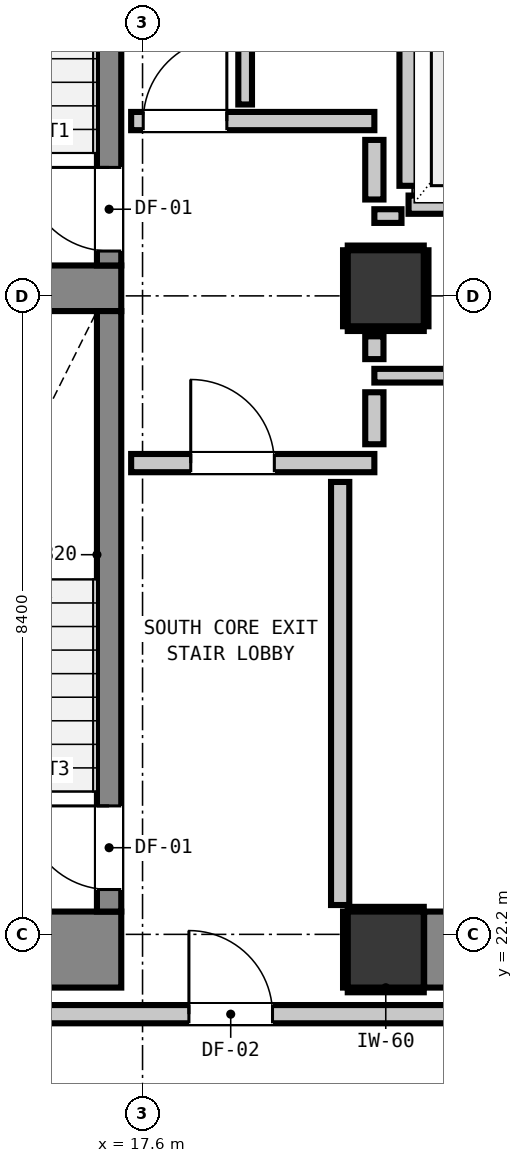
"""IFC4 building model, lengths in metres.
Left out: names, types, materials, properties, quantities, classifications, styles, units other than length and angle.
Written with IfcOpenShell. Run it as: python <this file> out.ifc"""

import sys

from ifc_helpers import new_model, si_unit, direction, frame, frame_2d, origin, origin_2d, place, context, subcontext, project, spatial, rectangle, extrude, element, fill, save


model = new_model("IFC4")
c1 = context("Model", 3, precision=1e-05, world=origin(), true_north=direction((0.0, 1.0)))
c2 = subcontext(c1, "Body", "Model", "MODEL_VIEW")
j1 = project(units=[si_unit("LENGTHUNIT", "METRE"), si_unit("PLANEANGLEUNIT", "RADIAN")], contexts=[c1])
p1 = place(None, origin())
s1 = spatial("IfcSite", under=j1, at=p1, CompositionType="ELEMENT")
p2 = place(p1, origin())
s2 = spatial("IfcBuilding", under=s1, at=p2, CompositionType="ELEMENT")
p3 = place(p2, frame((0.0, 0.0, 112.72)))
s3 = spatial("IfcBuildingStorey", under=s2, at=p3, CompositionType="ELEMENT", Elevation=112.72)
p4 = place(p3, frame((20.8, 22.0, 0.0), z_axis=(0.0, 0.0, 1.0), x_axis=(1.0, 0.0, 0.0)))
e1 = element("IfcColumn", 1, at=p4, inside=s3, PredefinedType="COLUMN", context=c2, shape_type="SweptSolid", body=[
    extrude(rectangle(XDim=1.0, YDim=1.0, at=origin_2d()), origin(), (0.0, 0.0, 1.0), 3.32),
])
p5 = place(p3, frame((13.24, 22.0, 0.0), z_axis=(0.0, 0.0, 1.0), x_axis=(1.0, 0.0, 0.0)))
e2 = element("IfcWall", 2, at=p5, inside=s3, PredefinedType="SHEAR", context=c2, shape_type="SweptSolid", body=[
    extrude(rectangle(XDim=4.08, YDim=1.0, at=frame_2d((2.04, 0.0))), origin(), (0.0, 0.0, 1.0), 3.32),
])
p6 = place(p3, frame((13.905, 30.7, 0.0), z_axis=(0.0, 0.0, 1.0), x_axis=(1.0, 0.0, 0.0)))
e3 = element("IfcWall", 3, at=p6, inside=s3, PredefinedType="SHEAR", context=c2, shape_type="SweptSolid", body=[
    extrude(rectangle(XDim=3.415, YDim=0.6, at=frame_2d((1.708, 0.0))), origin(), (0.0, 0.0, 1.0), 3.32),
])
p7 = place(p3, frame((21.305, 22.0, 0.0), z_axis=(0.0, 0.0, 1.0), x_axis=(1.0, 0.0, 0.0)))
e4 = element("IfcWall", 4, at=p7, inside=s3, PredefinedType="SHEAR", context=c2, shape_type="SweptSolid", body=[
    extrude(rectangle(XDim=7.39, YDim=1.0, at=frame_2d((3.695, 0.0))), origin(), (0.0, 0.0, 1.0), 3.32),
])
p8 = place(p3, frame((17.16, 31.0, 0.0), z_axis=(0.0, 0.0, 1.0), x_axis=(0.0, 1.0, 0.0)))
e5 = element("IfcWall", 5, at=p8, inside=s3, PredefinedType="SHEAR", context=c2, shape_type="SweptSolid", body=[
    extrude(rectangle(XDim=7.8, YDim=0.32, at=frame_2d((3.9, 0.0))), origin(), (0.0, 0.0, 1.0), 3.32),
])
p9 = place(p8, frame((0.19, 0.0, 0.0)))
e6 = element("IfcOpeningElement", 6, at=p9, cuts=e5, PredefinedType="OPENING", context=c2, shape_type="SweptSolid", body=[
    extrude(rectangle(XDim=1.1, YDim=2.15, at=frame_2d((0.55, 1.075))), frame((0.0, 0.17, 0.0), z_axis=(0.0, -1.0, 0.0), x_axis=(1.0, 0.0, 0.0)), (0.0, 0.0, 1.0), 0.34),
])
p10 = place(p3, frame((17.16, 22.5, 0.0), z_axis=(0.0, 0.0, 1.0), x_axis=(0.0, 1.0, 0.0)))
e7 = element("IfcWall", 7, at=p10, inside=s3, PredefinedType="SHEAR", context=c2, shape_type="SweptSolid", body=[
    extrude(rectangle(XDim=7.9, YDim=0.32, at=frame_2d((3.95, 0.0))), origin(), (0.0, 0.0, 1.0), 3.32),
])
p11 = place(p10, frame((0.29, 0.0, 0.0)))
e8 = element("IfcOpeningElement", 8, at=p11, cuts=e7, PredefinedType="OPENING", context=c2, shape_type="SweptSolid", body=[
    extrude(rectangle(XDim=1.1, YDim=2.15, at=frame_2d((0.55, 1.075))), frame((0.0, 0.17, 0.0), z_axis=(0.0, -1.0, 0.0), x_axis=(1.0, 0.0, 0.0)), (0.0, 0.0, 1.0), 0.34),
])
p12 = place(p3, frame((20.8, 30.7, 0.0), z_axis=(0.0, 0.0, 1.0), x_axis=(1.0, 0.0, 0.0)))
e9 = element("IfcColumn", 9, at=p12, inside=s3, PredefinedType="COLUMN", context=c2, shape_type="SweptSolid", body=[
    extrude(rectangle(XDim=1.0, YDim=1.0, at=origin_2d()), origin(), (0.0, 0.0, 1.0), 3.32),
])
p13 = place(p3, frame((21.1, 31.8, 0.0), z_axis=(0.0, 0.0, 1.0), x_axis=(1.0, 0.0, 0.0)))
e10 = element("IfcWall", 10, at=p13, inside=s3, PredefinedType="PARTITIONING", context=c2, shape_type="SweptSolid", body=[
    extrude(rectangle(XDim=2.2, YDim=0.24, at=frame_2d((1.1, 0.0))), origin(), (0.0, 0.0, 1.0), 3.08),
])
p14 = place(p3, frame((21.1, 32.048, 0.0), z_axis=(0.0, 0.0, 1.0), x_axis=(0.0, 1.0, 0.0)))
e11 = element("IfcWall", 11, at=p14, inside=s3, PredefinedType="PARTITIONING", context=c2, shape_type="SweptSolid", body=[
    extrude(rectangle(XDim=2.104, YDim=0.24, at=frame_2d((1.052, 0.0))), origin(), (0.0, 0.0, 1.0), 2.315),
])
p15 = place(p3, frame((3.207, 21.15, 0.0), z_axis=(0.0, 0.0, 1.0), x_axis=(1.0, 0.0, 0.0)))
e12 = element("IfcWall", 12, at=p15, inside=s3, PredefinedType="PARTITIONING", context=c2, shape_type="SweptSolid", body=[
    extrude(rectangle(XDim=39.386, YDim=0.24, at=frame_2d((19.693, 0.0))), origin(), (0.0, 0.0, 1.0), 3.08),
])
p16 = place(p15, frame((15.003, 0.0, 0.0)))
e13 = element("IfcOpeningElement", 13, at=p16, cuts=e12, PredefinedType="OPENING", context=c2, shape_type="SweptSolid", body=[
    extrude(rectangle(XDim=1.1, YDim=2.15, at=frame_2d((0.55, 1.075))), frame((0.0, 0.13, 0.0), z_axis=(0.0, -1.0, 0.0), x_axis=(1.0, 0.0, 0.0)), (0.0, 0.0, 1.0), 0.26),
])
p17 = place(p15, frame((7.243, 0.0, 0.0)))
e14 = element("IfcOpeningElement", 14, at=p17, cuts=e12, PredefinedType="OPENING", context=c2, shape_type="SweptSolid", body=[
    extrude(rectangle(XDim=1.4, YDim=2.15, at=frame_2d((0.7, 1.075))), frame((0.0, 0.13, 0.0), z_axis=(0.0, -1.0, 0.0), x_axis=(1.0, 0.0, 0.0)), (0.0, 0.0, 1.0), 0.26),
])
p18 = place(p15, frame((34.843, 0.0, 0.0)))
e15 = element("IfcOpeningElement", 15, at=p18, cuts=e12, PredefinedType="OPENING", context=c2, shape_type="SweptSolid", body=[
    extrude(rectangle(XDim=1.4, YDim=2.15, at=frame_2d((0.7, 1.075))), frame((0.0, 0.13, 0.0), z_axis=(0.0, -1.0, 0.0), x_axis=(1.0, 0.0, 0.0)), (0.0, 0.0, 1.0), 0.26),
])
p19 = place(p3, frame((17.45, 28.4, 0.0), z_axis=(0.0, 0.0, 1.0), x_axis=(1.0, 0.0, 0.0)))
e16 = element("IfcWall", 16, at=p19, inside=s3, PredefinedType="PARTITIONING", context=c2, shape_type="SweptSolid", body=[
    extrude(rectangle(XDim=3.2, YDim=0.24, at=frame_2d((1.6, 0.0))), origin(), (0.0, 0.0, 1.0), 3.08),
])
p20 = place(p19, frame((0.784, 0.0, 0.0)))
e17 = element("IfcOpeningElement", 17, at=p20, cuts=e16, PredefinedType="OPENING", context=c2, shape_type="SweptSolid", body=[
    extrude(rectangle(XDim=1.1, YDim=2.15, at=frame_2d((0.55, 1.075))), frame((0.0, 0.13, 0.0), z_axis=(0.0, -1.0, 0.0), x_axis=(1.0, 0.0, 0.0)), (0.0, 0.0, 1.0), 0.26),
])
p21 = place(p3, frame((17.45, 32.9, 0.0), z_axis=(0.0, 0.0, 1.0), x_axis=(1.0, 0.0, 0.0)))
e18 = element("IfcWall", 18, at=p21, inside=s3, PredefinedType="PARTITIONING", context=c2, shape_type="SweptSolid", body=[
    extrude(rectangle(XDim=3.2, YDim=0.24, at=frame_2d((1.6, 0.0))), origin(), (0.0, 0.0, 1.0), 3.08),
])
p22 = place(p21, frame((0.159, 0.0, 0.0)))
e19 = element("IfcOpeningElement", 19, at=p22, cuts=e18, PredefinedType="OPENING", context=c2, shape_type="SweptSolid", body=[
    extrude(rectangle(XDim=1.1, YDim=2.15, at=frame_2d((0.55, 1.075))), frame((0.0, 0.13, 0.0), z_axis=(0.0, -1.0, 0.0), x_axis=(1.0, 0.0, 0.0)), (0.0, 0.0, 1.0), 0.26),
])
p23 = place(p3, frame((20.65, 29.55, 0.0), z_axis=(0.0, 0.0, 1.0), x_axis=(1.0, 0.0, 0.0)))
e20 = element("IfcWall", 20, at=p23, inside=s3, PredefinedType="PARTITIONING", context=c2, shape_type="SweptSolid", body=[
    extrude(rectangle(XDim=9.325, YDim=0.18, at=frame_2d((4.663, 0.0))), origin(), (0.0, 0.0, 1.0), 3.08),
])
p24 = place(p3, frame((20.65, 31.65, 0.0), z_axis=(0.0, 0.0, 1.0), x_axis=(1.0, 0.0, 0.0)))
e21 = element("IfcWall", 21, at=p24, inside=s3, PredefinedType="PARTITIONING", context=c2, shape_type="SweptSolid", body=[
    extrude(rectangle(XDim=0.357, YDim=0.18, at=frame_2d((0.179, 0.0))), origin(), (0.0, 0.0, 1.0), 3.08),
])
p25 = place(p3, frame((20.2, 22.586, 0.0), z_axis=(0.0, 0.0, 1.0), x_axis=(0.0, 1.0, 0.0)))
e22 = element("IfcWall", 22, at=p25, inside=s3, PredefinedType="PARTITIONING", context=c2, shape_type="SweptSolid", body=[
    extrude(rectangle(XDim=5.566, YDim=0.24, at=frame_2d((2.783, 0.0))), origin(), (0.0, 0.0, 1.0), 3.08),
])
p26 = place(p3, frame((20.65, 28.648, 0.0), z_axis=(0.0, 0.0, 1.0), x_axis=(0.0, 1.0, 0.0)))
e23 = element("IfcWall", 23, at=p26, inside=s3, PredefinedType="PARTITIONING", context=c2, shape_type="SweptSolid", body=[
    extrude(rectangle(XDim=0.684, YDim=0.24, at=frame_2d((0.342, 0.0))), origin(), (0.0, 0.0, 1.0), 2.315),
])
p27 = place(p3, frame((20.65, 29.768, 0.0), z_axis=(0.0, 0.0, 1.0), x_axis=(0.0, 1.0, 0.0)))
e24 = element("IfcWall", 24, at=p27, inside=s3, PredefinedType="PARTITIONING", context=c2, shape_type="SweptSolid", body=[
    extrude(rectangle(XDim=0.3, YDim=0.24, at=frame_2d((0.15, 0.0))), origin(), (0.0, 0.0, 1.0), 2.315),
])
p28 = place(p3, frame((20.65, 31.868, 0.0), z_axis=(0.0, 0.0, 1.0), x_axis=(0.0, 1.0, 0.0)))
e25 = element("IfcWall", 25, at=p28, inside=s3, PredefinedType="PARTITIONING", context=c2, shape_type="SweptSolid", body=[
    extrude(rectangle(XDim=0.784, YDim=0.24, at=frame_2d((0.392, 0.0))), origin(), (0.0, 0.0, 1.0), 2.315),
])
p29 = place(p3, frame((18.95, 33.118, 0.0), z_axis=(0.0, 0.0, 1.0), x_axis=(0.0, 1.0, 0.0)))
e26 = element("IfcWall", 26, at=p29, inside=s3, PredefinedType="PARTITIONING", context=c2, shape_type="SweptSolid", body=[
    extrude(rectangle(XDim=2.374, YDim=0.18, at=frame_2d((1.187, 0.0))), origin(), (0.0, 0.0, 1.0), 3.08),
])
for number, where, z_axis, x_axis in (
    (27, (20.3, 21.468, 0.0), (0.0, 0.0, 1.0), (1.0, 0.0, 0.0)),
    (28, (20.3, 22.532, 0.0), (0.0, 0.0, 1.0), (1.0, 0.0, 0.0)),
    (29, (20.268, 21.5, 0.0), (0.0, 0.0, 1.0), (0.0, 1.0, 0.0)),
    (30, (20.3, 30.168, 0.0), (0.0, 0.0, 1.0), (1.0, 0.0, 0.0)),
    (31, (20.3, 31.232, 0.0), (0.0, 0.0, 1.0), (1.0, 0.0, 0.0)),
    (32, (20.268, 30.2, 0.0), (0.0, 0.0, 1.0), (0.0, 1.0, 0.0)),
    (33, (21.332, 30.2, 0.0), (0.0, 0.0, 1.0), (0.0, 1.0, 0.0)),
):
    element("IfcWall", number, at=place(p3, frame(where, z_axis=z_axis, x_axis=x_axis)), inside=s3, PredefinedType="PARTITIONING", context=c2, shape_type="SweptSolid", body=[
        extrude(rectangle(XDim=1.0, YDim=0.06, at=frame_2d((0.5, 0.0))), origin(), (0.0, 0.0, 1.0), 1.45),
    ])
p30 = place(p9, origin())
e34 = element("IfcDoor", 34, at=p30, inside=s3, OperationType="SINGLE_SWING_RIGHT", PredefinedType="DOOR", context=c2, shape_type="SweptSolid", body=[
    extrude(rectangle(XDim=1.1, YDim=2.15, at=frame_2d((0.55, 1.075))), frame((0.0, 0.025, 0.0), z_axis=(0.0, -1.0, 0.0), x_axis=(1.0, 0.0, 0.0)), (0.0, 0.0, 1.0), 0.05),
])
fill(e6, e34)
p31 = place(p11, origin())
e35 = element("IfcDoor", 35, at=p31, inside=s3, OperationType="SINGLE_SWING_RIGHT", PredefinedType="DOOR", context=c2, shape_type="SweptSolid", body=[
    extrude(rectangle(XDim=1.1, YDim=2.15, at=frame_2d((0.55, 1.075))), frame((0.0, 0.025, 0.0), z_axis=(0.0, -1.0, 0.0), x_axis=(1.0, 0.0, 0.0)), (0.0, 0.0, 1.0), 0.05),
])
fill(e8, e35)
p32 = place(p20, origin())
e36 = element("IfcDoor", 36, at=p32, inside=s3, OperationType="SINGLE_SWING_LEFT", PredefinedType="DOOR", context=c2, shape_type="SweptSolid", body=[
    extrude(rectangle(XDim=1.1, YDim=2.15, at=frame_2d((0.55, 1.075))), frame((0.0, 0.025, 0.0), z_axis=(0.0, -1.0, 0.0), x_axis=(1.0, 0.0, 0.0)), (0.0, 0.0, 1.0), 0.05),
])
fill(e17, e36)
p33 = place(p22, origin())
e37 = element("IfcDoor", 37, at=p33, inside=s3, OperationType="SINGLE_SWING_RIGHT", PredefinedType="DOOR", context=c2, shape_type="SweptSolid", body=[
    extrude(rectangle(XDim=1.1, YDim=2.15, at=frame_2d((0.55, 1.075))), frame((0.0, 0.025, 0.0), z_axis=(0.0, -1.0, 0.0), x_axis=(1.0, 0.0, 0.0)), (0.0, 0.0, 1.0), 0.05),
])
fill(e19, e37)
p34 = place(p16, origin())
e38 = element("IfcDoor", 38, at=p34, inside=s3, OperationType="SINGLE_SWING_LEFT", PredefinedType="DOOR", context=c2, shape_type="SweptSolid", body=[
    extrude(rectangle(XDim=1.1, YDim=2.15, at=frame_2d((0.55, 1.075))), frame((0.0, 0.025, 0.0), z_axis=(0.0, -1.0, 0.0), x_axis=(1.0, 0.0, 0.0)), (0.0, 0.0, 1.0), 0.05),
])
fill(e13, e38)
save(model, sys.argv[1])
